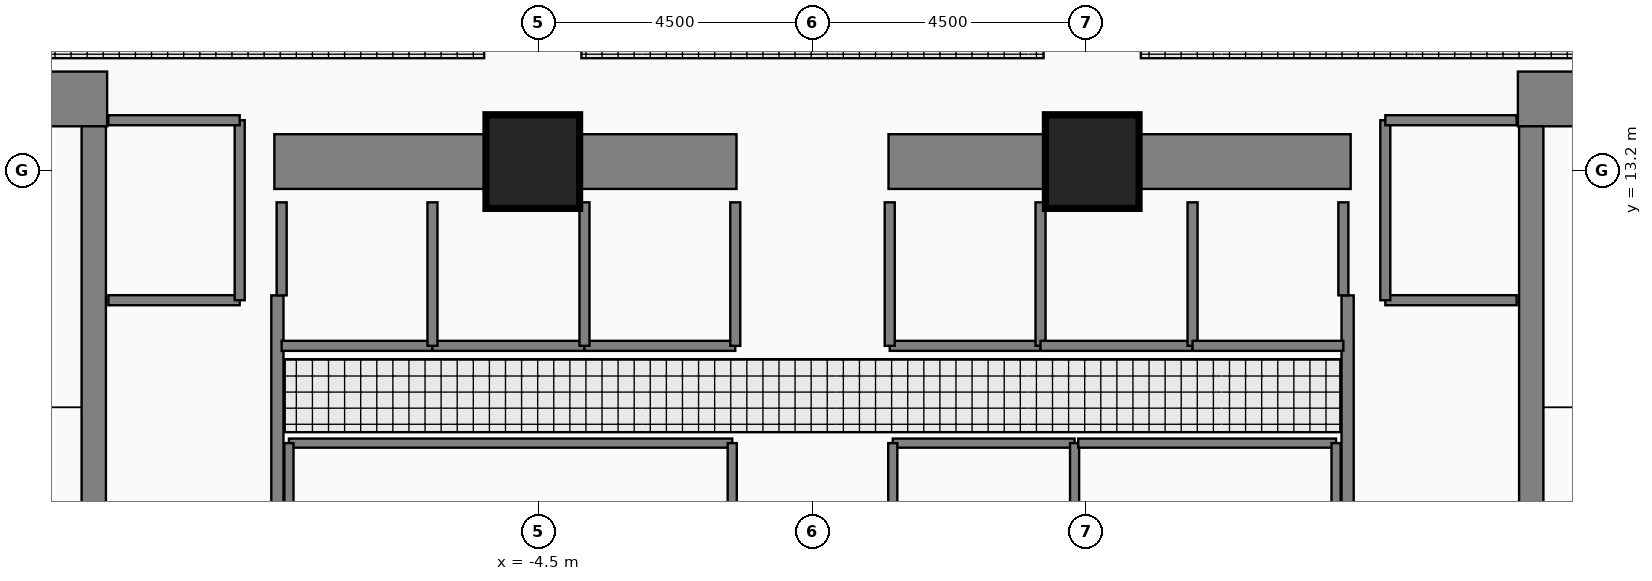
"""IFC4 building model, lengths in metres.
Left out: names, types, materials, properties, quantities, classifications, styles, units other than length and angle.
Written with IfcOpenShell. Run it as: python <this file> out.ifc"""

import sys

from ifc_helpers import new_model, si_unit, direction, frame, frame_2d, origin, origin_2d, place, context, subcontext, project, spatial, rectangle, extrude, element, fill, save


model = new_model("IFC4")
c1 = context("Model", 3, precision=1e-05, world=origin(), true_north=direction((0.0, 1.0)))
c2 = subcontext(c1, "Body", "Model", "MODEL_VIEW")
j1 = project(units=[si_unit("LENGTHUNIT", "METRE"), si_unit("PLANEANGLEUNIT", "RADIAN")], contexts=[c1])
p1 = place(None, origin())
s1 = spatial("IfcSite", under=j1, at=p1, CompositionType="ELEMENT")
p2 = place(p1, origin())
s2 = spatial("IfcBuilding", under=s1, at=p2, CompositionType="ELEMENT")
p3 = place(p2, frame((0.0, 0.0, 11.4)))
s3 = spatial("IfcBuildingStorey", under=s2, at=p3, CompositionType="ELEMENT", Elevation=11.4)
for number, where, z_axis, x_axis in (
    (1, (-16.31, 14.38, 0.0), (0.0, 0.0, 1.0), (1.0, 0.0, 0.0)),
    (2, (11.6, 14.38, 0.0), (0.0, 0.0, 1.0), (1.0, 0.0, 0.0)),
):
    element("IfcWall", number, at=place(p3, frame(where, z_axis=z_axis, x_axis=x_axis)), inside=s3, PredefinedType="SHEAR", context=c2, shape_type="SweptSolid", body=[
        extrude(rectangle(XDim=4.71, YDim=0.9, at=frame_2d((2.355, 0.0))), origin(), (0.0, 0.0, 1.0), 6.41),
    ])
for number, where, z_axis, x_axis in (
    (3, (-8.85, 13.35, 0.0), (0.0, 0.0, 1.0), (1.0, 0.0, 0.0)),
    (4, (1.25, 13.35, 0.0), (0.0, 0.0, 1.0), (1.0, 0.0, 0.0)),
):
    element("IfcWall", number, at=place(p3, frame(where, z_axis=z_axis, x_axis=x_axis)), inside=s3, PredefinedType="SHEAR", context=c2, shape_type="SweptSolid", body=[
        extrude(rectangle(XDim=7.6, YDim=0.9, at=frame_2d((3.8, 0.0))), origin(), (0.0, 0.0, 1.0), 6.34),
    ])
p4 = place(p3, frame((-11.82, 4.97, 0.0), z_axis=(0.0, 0.0, 1.0), x_axis=(0.0, 1.0, 0.0)))
e5 = element("IfcWall", 5, at=p4, inside=s3, PredefinedType="SHEAR", context=c2, shape_type="SweptSolid", body=[
    extrude(rectangle(XDim=8.96, YDim=0.4, at=frame_2d((4.48, 0.0))), origin(), (0.0, 0.0, 1.0), 6.41),
])
p5 = place(p4, frame((0.31, 0.0, 0.0)))
e6 = element("IfcOpeningElement", 6, at=p5, cuts=e5, PredefinedType="OPENING", context=c2, shape_type="SweptSolid", body=[
    extrude(rectangle(XDim=1.12, YDim=2.22, at=frame_2d((0.56, 1.11))), frame((0.0, 0.21, 0.0), z_axis=(0.0, -1.0, 0.0), x_axis=(1.0, 0.0, 0.0)), (0.0, 0.0, 1.0), 0.42),
])
p6 = place(p3, frame((11.82, 13.93, 0.0), z_axis=(0.0, 0.0, 1.0), x_axis=(0.0, -1.0, 0.0)))
e7 = element("IfcWall", 7, at=p6, inside=s3, PredefinedType="SHEAR", context=c2, shape_type="SweptSolid", body=[
    extrude(rectangle(XDim=8.96, YDim=0.4, at=frame_2d((4.48, 0.0))), origin(), (0.0, 0.0, 1.0), 6.41),
])
p7 = place(p6, frame((7.53, 0.0, 0.0)))
e8 = element("IfcOpeningElement", 8, at=p7, cuts=e7, PredefinedType="OPENING", context=c2, shape_type="SweptSolid", body=[
    extrude(rectangle(XDim=1.12, YDim=2.22, at=frame_2d((0.56, 1.11))), frame((0.0, 0.21, 0.0), z_axis=(0.0, -1.0, 0.0), x_axis=(1.0, 0.0, 0.0)), (0.0, 0.0, 1.0), 0.42),
])
for number, where, z_axis, x_axis in (
    (9, (-4.6, 13.35, 0.0), (0.0, 0.0, 1.0), (1.0, 0.0, 0.0)),
    (10, (4.6, 13.35, 0.0), (0.0, 0.0, 1.0), (1.0, 0.0, 0.0)),
):
    element("IfcColumn", number, at=place(p3, frame(where, z_axis=z_axis, x_axis=x_axis)), inside=s3, PredefinedType="COLUMN", context=c2, shape_type="SweptSolid", body=[
        extrude(rectangle(XDim=1.5, YDim=1.5, at=origin_2d()), origin(), (0.0, 0.0, 1.0), 6.6),
    ])
p8 = place(p3, frame((-8.8, 5.05, 0.0), z_axis=(0.0, 0.0, 1.0), x_axis=(0.0, 1.0, 0.0)))
e11 = element("IfcWall", 11, at=p8, inside=s3, PredefinedType="PARTITIONING", context=c2, shape_type="SweptSolid", body=[
    extrude(rectangle(XDim=6.1, YDim=0.2, at=frame_2d((3.05, 0.0))), origin(), (0.0, 0.0, 1.0), 6.34),
])
p9 = place(p8, frame((0.25, 0.0, 0.0)))
e12 = element("IfcOpeningElement", 12, at=p9, cuts=e11, PredefinedType="OPENING", context=c2, shape_type="SweptSolid", body=[
    extrude(rectangle(XDim=1.1, YDim=2.2, at=frame_2d((0.55, 1.1))), frame((0.0, 0.11, 0.0), z_axis=(0.0, -1.0, 0.0), x_axis=(1.0, 0.0, 0.0)), (0.0, 0.0, 1.0), 0.22),
])
p10 = place(p8, frame((3.85, 0.0, 0.0)))
e13 = element("IfcOpeningElement", 13, at=p10, cuts=e11, PredefinedType="OPENING", context=c2, shape_type="SweptSolid", body=[
    extrude(rectangle(XDim=1.1, YDim=2.2, at=frame_2d((0.55, 1.1))), frame((0.0, 0.11, 0.0), z_axis=(0.0, -1.0, 0.0), x_axis=(1.0, 0.0, 0.0)), (0.0, 0.0, 1.0), 0.22),
])
p11 = place(p3, frame((8.8, 11.15, 0.0), z_axis=(0.0, 0.0, 1.0), x_axis=(0.0, -1.0, 0.0)))
e14 = element("IfcWall", 14, at=p11, inside=s3, PredefinedType="PARTITIONING", context=c2, shape_type="SweptSolid", body=[
    extrude(rectangle(XDim=6.1, YDim=0.2, at=frame_2d((3.05, 0.0))), origin(), (0.0, 0.0, 1.0), 6.34),
])
p12 = place(p11, frame((1.15, 0.0, 0.0)))
e15 = element("IfcOpeningElement", 15, at=p12, cuts=e14, PredefinedType="OPENING", context=c2, shape_type="SweptSolid", body=[
    extrude(rectangle(XDim=1.1, YDim=2.2, at=frame_2d((0.55, 1.1))), frame((0.0, 0.11, 0.0), z_axis=(0.0, -1.0, 0.0), x_axis=(1.0, 0.0, 0.0)), (0.0, 0.0, 1.0), 0.22),
])
p13 = place(p11, frame((4.75, 0.0, 0.0)))
e16 = element("IfcOpeningElement", 16, at=p13, cuts=e14, PredefinedType="OPENING", context=c2, shape_type="SweptSolid", body=[
    extrude(rectangle(XDim=1.1, YDim=2.2, at=frame_2d((0.55, 1.1))), frame((0.0, 0.11, 0.0), z_axis=(0.0, -1.0, 0.0), x_axis=(1.0, 0.0, 0.0)), (0.0, 0.0, 1.0), 0.22),
])
p14 = place(p3, frame((-11.58, 11.07, 0.0), z_axis=(0.0, 0.0, 1.0), x_axis=(1.0, 0.0, 0.0)))
e17 = element("IfcWall", 17, at=p14, inside=s3, PredefinedType="PARTITIONING", context=c2, shape_type="SweptSolid", body=[
    extrude(rectangle(XDim=2.16, YDim=0.165, at=frame_2d((1.08, 0.0))), origin(), (0.0, 0.0, 1.0), 6.34),
])
p15 = place(p14, frame((0.53, 0.0, 0.0)))
e18 = element("IfcOpeningElement", 18, at=p15, cuts=e17, PredefinedType="OPENING", context=c2, shape_type="SweptSolid", body=[
    extrude(rectangle(XDim=1.15, YDim=2.25, at=frame_2d((0.575, 1.125))), frame((0.0, 0.093, 0.0), z_axis=(0.0, -1.0, 0.0), x_axis=(1.0, 0.0, 0.0)), (0.0, 0.0, 1.0), 0.185),
])
p16 = place(p3, frame((9.42, 11.07, 0.0), z_axis=(0.0, 0.0, 1.0), x_axis=(1.0, 0.0, 0.0)))
e19 = element("IfcWall", 19, at=p16, inside=s3, PredefinedType="PARTITIONING", context=c2, shape_type="SweptSolid", body=[
    extrude(rectangle(XDim=2.16, YDim=0.165, at=frame_2d((1.08, 0.0))), origin(), (0.0, 0.0, 1.0), 6.34),
])
p17 = place(p16, frame((0.53, 0.0, 0.0)))
e20 = element("IfcOpeningElement", 20, at=p17, cuts=e19, PredefinedType="OPENING", context=c2, shape_type="SweptSolid", body=[
    extrude(rectangle(XDim=1.15, YDim=2.25, at=frame_2d((0.575, 1.125))), frame((0.0, 0.093, 0.0), z_axis=(0.0, -1.0, 0.0), x_axis=(1.0, 0.0, 0.0)), (0.0, 0.0, 1.0), 0.185),
])
p18 = place(p3, frame((-8.73, 10.32, 0.0), z_axis=(0.0, 0.0, 1.0), x_axis=(1.0, 0.0, 0.0)))
e21 = element("IfcWall", 21, at=p18, inside=s3, PredefinedType="PARTITIONING", context=c2, shape_type="SweptSolid", body=[
    extrude(rectangle(XDim=2.48, YDim=0.165, at=frame_2d((1.24, 0.0))), origin(), (0.0, 0.0, 1.0), 6.34),
])
p19 = place(p18, frame((0.69, 0.0, 0.0)))
e22 = element("IfcOpeningElement", 22, at=p19, cuts=e21, PredefinedType="OPENING", context=c2, shape_type="SweptSolid", body=[
    extrude(rectangle(XDim=1.1, YDim=2.25, at=frame_2d((0.55, 1.125))), frame((0.0, 0.093, 0.0), z_axis=(0.0, -1.0, 0.0), x_axis=(1.0, 0.0, 0.0)), (0.0, 0.0, 1.0), 0.185),
])
p20 = place(p3, frame((-6.25, 10.32, 0.0), z_axis=(0.0, 0.0, 1.0), x_axis=(1.0, 0.0, 0.0)))
e23 = element("IfcWall", 23, at=p20, inside=s3, PredefinedType="PARTITIONING", context=c2, shape_type="SweptSolid", body=[
    extrude(rectangle(XDim=2.5, YDim=0.165, at=frame_2d((1.25, 0.0))), origin(), (0.0, 0.0, 1.0), 6.34),
])
p21 = place(p20, frame((0.7, 0.0, 0.0)))
e24 = element("IfcOpeningElement", 24, at=p21, cuts=e23, PredefinedType="OPENING", context=c2, shape_type="SweptSolid", body=[
    extrude(rectangle(XDim=1.1, YDim=2.25, at=frame_2d((0.55, 1.125))), frame((0.0, 0.093, 0.0), z_axis=(0.0, -1.0, 0.0), x_axis=(1.0, 0.0, 0.0)), (0.0, 0.0, 1.0), 0.185),
])
p22 = place(p3, frame((-3.75, 10.32, 0.0), z_axis=(0.0, 0.0, 1.0), x_axis=(1.0, 0.0, 0.0)))
e25 = element("IfcWall", 25, at=p22, inside=s3, PredefinedType="PARTITIONING", context=c2, shape_type="SweptSolid", body=[
    extrude(rectangle(XDim=2.48, YDim=0.165, at=frame_2d((1.24, 0.0))), origin(), (0.0, 0.0, 1.0), 6.34),
])
p23 = place(p22, frame((0.69, 0.0, 0.0)))
e26 = element("IfcOpeningElement", 26, at=p23, cuts=e25, PredefinedType="OPENING", context=c2, shape_type="SweptSolid", body=[
    extrude(rectangle(XDim=1.1, YDim=2.25, at=frame_2d((0.55, 1.125))), frame((0.0, 0.093, 0.0), z_axis=(0.0, -1.0, 0.0), x_axis=(1.0, 0.0, 0.0)), (0.0, 0.0, 1.0), 0.185),
])
p24 = place(p3, frame((1.27, 10.32, 0.0), z_axis=(0.0, 0.0, 1.0), x_axis=(1.0, 0.0, 0.0)))
e27 = element("IfcWall", 27, at=p24, inside=s3, PredefinedType="PARTITIONING", context=c2, shape_type="SweptSolid", body=[
    extrude(rectangle(XDim=2.48, YDim=0.165, at=frame_2d((1.24, 0.0))), origin(), (0.0, 0.0, 1.0), 6.34),
])
p25 = place(p24, frame((0.69, 0.0, 0.0)))
e28 = element("IfcOpeningElement", 28, at=p25, cuts=e27, PredefinedType="OPENING", context=c2, shape_type="SweptSolid", body=[
    extrude(rectangle(XDim=1.1, YDim=2.25, at=frame_2d((0.55, 1.125))), frame((0.0, 0.093, 0.0), z_axis=(0.0, -1.0, 0.0), x_axis=(1.0, 0.0, 0.0)), (0.0, 0.0, 1.0), 0.185),
])
p26 = place(p3, frame((1.32, 8.72, 0.0), z_axis=(0.0, 0.0, 1.0), x_axis=(1.0, 0.0, 0.0)))
e29 = element("IfcWall", 29, at=p26, inside=s3, PredefinedType="PARTITIONING", context=c2, shape_type="SweptSolid", body=[
    extrude(rectangle(XDim=2.99, YDim=0.15, at=frame_2d((1.495, 0.0))), origin(), (0.0, 0.0, 1.0), 6.34),
])
p27 = place(p26, frame((1.045, 0.0, 0.0)))
e30 = element("IfcOpeningElement", 30, at=p27, cuts=e29, PredefinedType="OPENING", context=c2, shape_type="SweptSolid", body=[
    extrude(rectangle(XDim=0.9, YDim=2.15, at=frame_2d((0.45, 1.075))), frame((0.0, 0.085, 0.0), z_axis=(0.0, -1.0, 0.0), x_axis=(1.0, 0.0, 0.0)), (0.0, 0.0, 1.0), 0.17),
])
p28 = place(p3, frame((-9.42, 11.07, 0.0), z_axis=(0.0, 0.0, 1.0), x_axis=(0.0, 1.0, 0.0)))
e31 = element("IfcWall", 31, at=p28, inside=s3, PredefinedType="PARTITIONING", context=c2, shape_type="SweptSolid", body=[
    extrude(rectangle(XDim=2.96, YDim=0.165, at=frame_2d((1.48, 0.0))), origin(), (0.0, 0.0, 1.0), 6.34),
])
p29 = place(p3, frame((-11.58, 14.03, 0.0), z_axis=(0.0, 0.0, 1.0), x_axis=(1.0, 0.0, 0.0)))
e32 = element("IfcWall", 32, at=p29, inside=s3, PredefinedType="PARTITIONING", context=c2, shape_type="SweptSolid", body=[
    extrude(rectangle(XDim=2.16, YDim=0.165, at=frame_2d((1.08, 0.0))), origin(), (0.0, 0.0, 1.0), 6.34),
])
p30 = place(p3, frame((9.42, 11.07, 0.0), z_axis=(0.0, 0.0, 1.0), x_axis=(0.0, 1.0, 0.0)))
e33 = element("IfcWall", 33, at=p30, inside=s3, PredefinedType="PARTITIONING", context=c2, shape_type="SweptSolid", body=[
    extrude(rectangle(XDim=2.96, YDim=0.165, at=frame_2d((1.48, 0.0))), origin(), (0.0, 0.0, 1.0), 6.34),
])
p31 = place(p3, frame((9.42, 14.03, 0.0), z_axis=(0.0, 0.0, 1.0), x_axis=(1.0, 0.0, 0.0)))
e34 = element("IfcWall", 34, at=p31, inside=s3, PredefinedType="PARTITIONING", context=c2, shape_type="SweptSolid", body=[
    extrude(rectangle(XDim=2.16, YDim=0.165, at=frame_2d((1.08, 0.0))), origin(), (0.0, 0.0, 1.0), 6.34),
])
p32 = place(p3, frame((-8.73, 11.15, 0.0), z_axis=(0.0, 0.0, 1.0), x_axis=(0.0, 1.0, 0.0)))
e35 = element("IfcWall", 35, at=p32, inside=s3, PredefinedType="PARTITIONING", context=c2, shape_type="SweptSolid", body=[
    extrude(rectangle(XDim=1.53, YDim=0.165, at=frame_2d((0.765, 0.0))), origin(), (0.0, 0.0, 1.0), 6.34),
])
for number, where, z_axis, x_axis in (
    (36, (-6.25, 10.32, 0.0), (0.0, 0.0, 1.0), (0.0, 1.0, 0.0)),
    (37, (-3.75, 10.32, 0.0), (0.0, 0.0, 1.0), (0.0, 1.0, 0.0)),
    (38, (-1.27, 10.32, 0.0), (0.0, 0.0, 1.0), (0.0, 1.0, 0.0)),
    (39, (1.27, 10.32, 0.0), (0.0, 0.0, 1.0), (0.0, 1.0, 0.0)),
    (40, (3.75, 10.32, 0.0), (0.0, 0.0, 1.0), (0.0, 1.0, 0.0)),
):
    element("IfcWall", number, at=place(p3, frame(where, z_axis=z_axis, x_axis=x_axis)), inside=s3, PredefinedType="PARTITIONING", context=c2, shape_type="SweptSolid", body=[
        extrude(rectangle(XDim=2.36, YDim=0.165, at=frame_2d((1.18, 0.0))), origin(), (0.0, 0.0, 1.0), 6.34),
    ])
p33 = place(p3, frame((3.75, 10.32, 0.0), z_axis=(0.0, 0.0, 1.0), x_axis=(1.0, 0.0, 0.0)))
e41 = element("IfcWall", 41, at=p33, inside=s3, PredefinedType="PARTITIONING", context=c2, shape_type="SweptSolid", body=[
    extrude(rectangle(XDim=2.5, YDim=0.165, at=frame_2d((1.25, 0.0))), origin(), (0.0, 0.0, 1.0), 6.34),
])
p34 = place(p3, frame((6.25, 10.32, 0.0), z_axis=(0.0, 0.0, 1.0), x_axis=(0.0, 1.0, 0.0)))
e42 = element("IfcWall", 42, at=p34, inside=s3, PredefinedType="PARTITIONING", context=c2, shape_type="SweptSolid", body=[
    extrude(rectangle(XDim=2.36, YDim=0.165, at=frame_2d((1.18, 0.0))), origin(), (0.0, 0.0, 1.0), 6.34),
])
p35 = place(p3, frame((6.25, 10.32, 0.0), z_axis=(0.0, 0.0, 1.0), x_axis=(1.0, 0.0, 0.0)))
e43 = element("IfcWall", 43, at=p35, inside=s3, PredefinedType="PARTITIONING", context=c2, shape_type="SweptSolid", body=[
    extrude(rectangle(XDim=2.48, YDim=0.165, at=frame_2d((1.24, 0.0))), origin(), (0.0, 0.0, 1.0), 6.34),
])
p36 = place(p3, frame((8.73, 11.15, 0.0), z_axis=(0.0, 0.0, 1.0), x_axis=(0.0, 1.0, 0.0)))
e44 = element("IfcWall", 44, at=p36, inside=s3, PredefinedType="PARTITIONING", context=c2, shape_type="SweptSolid", body=[
    extrude(rectangle(XDim=1.53, YDim=0.165, at=frame_2d((0.765, 0.0))), origin(), (0.0, 0.0, 1.0), 6.34),
])
p37 = place(p3, frame((-8.61, 8.72, 0.0), z_axis=(0.0, 0.0, 1.0), x_axis=(1.0, 0.0, 0.0)))
e45 = element("IfcWall", 45, at=p37, inside=s3, PredefinedType="PARTITIONING", context=c2, shape_type="SweptSolid", body=[
    extrude(rectangle(XDim=7.29, YDim=0.15, at=frame_2d((3.645, 0.0))), origin(), (0.0, 0.0, 1.0), 6.34),
])
for number, where, z_axis, x_axis in (
    (46, (-8.61, 6.48, 0.0), (0.0, 0.0, 1.0), (0.0, 1.0, 0.0)),
    (47, (-1.32, 6.48, 0.0), (0.0, 0.0, 1.0), (0.0, 1.0, 0.0)),
    (48, (1.32, 6.48, 0.0), (0.0, 0.0, 1.0), (0.0, 1.0, 0.0)),
    (49, (4.31, 6.48, 0.0), (0.0, 0.0, 1.0), (0.0, 1.0, 0.0)),
):
    element("IfcWall", number, at=place(p3, frame(where, z_axis=z_axis, x_axis=x_axis)), inside=s3, PredefinedType="PARTITIONING", context=c2, shape_type="SweptSolid", body=[
        extrude(rectangle(XDim=2.24, YDim=0.15, at=frame_2d((1.12, 0.0))), origin(), (0.0, 0.0, 1.0), 6.34),
    ])
p38 = place(p3, frame((4.37, 8.72, 0.0), z_axis=(0.0, 0.0, 1.0), x_axis=(1.0, 0.0, 0.0)))
e50 = element("IfcWall", 50, at=p38, inside=s3, PredefinedType="PARTITIONING", context=c2, shape_type="SweptSolid", body=[
    extrude(rectangle(XDim=4.24, YDim=0.15, at=frame_2d((2.12, 0.0))), origin(), (0.0, 0.0, 1.0), 6.34),
])
p39 = place(p3, frame((8.61, 6.48, 0.0), z_axis=(0.0, 0.0, 1.0), x_axis=(0.0, 1.0, 0.0)))
e51 = element("IfcWall", 51, at=p39, inside=s3, PredefinedType="PARTITIONING", context=c2, shape_type="SweptSolid", body=[
    extrude(rectangle(XDim=2.24, YDim=0.15, at=frame_2d((1.12, 0.0))), origin(), (0.0, 0.0, 1.0), 6.34),
])
p40 = place(p10, origin())
e52 = element("IfcDoor", 52, at=p40, inside=s3, OperationType="SINGLE_SWING_LEFT", PredefinedType="DOOR", context=c2, shape_type="SweptSolid", body=[
    extrude(rectangle(XDim=1.1, YDim=2.2, at=frame_2d((0.55, 1.1))), frame((0.0, 0.025, 0.0), z_axis=(0.0, -1.0, 0.0), x_axis=(1.0, 0.0, 0.0)), (0.0, 0.0, 1.0), 0.05),
])
fill(e13, e52)
p41 = place(p12, origin())
e53 = element("IfcDoor", 53, at=p41, inside=s3, OperationType="SINGLE_SWING_RIGHT", PredefinedType="DOOR", context=c2, shape_type="SweptSolid", body=[
    extrude(rectangle(XDim=1.1, YDim=2.2, at=frame_2d((0.55, 1.1))), frame((0.0, 0.025, 0.0), z_axis=(0.0, -1.0, 0.0), x_axis=(1.0, 0.0, 0.0)), (0.0, 0.0, 1.0), 0.05),
])
fill(e15, e53)
p42 = place(p15, origin())
e54 = element("IfcDoor", 54, at=p42, inside=s3, OperationType="SLIDING_TO_LEFT", PredefinedType="DOOR", context=c2, shape_type="SweptSolid", body=[
    extrude(rectangle(XDim=1.15, YDim=2.25, at=frame_2d((0.575, 1.125))), frame((0.0, 0.025, 0.0), z_axis=(0.0, -1.0, 0.0), x_axis=(1.0, 0.0, 0.0)), (0.0, 0.0, 1.0), 0.05),
])
fill(e18, e54)
p43 = place(p17, origin())
e55 = element("IfcDoor", 55, at=p43, inside=s3, OperationType="SLIDING_TO_LEFT", PredefinedType="DOOR", context=c2, shape_type="SweptSolid", body=[
    extrude(rectangle(XDim=1.15, YDim=2.25, at=frame_2d((0.575, 1.125))), frame((0.0, 0.025, 0.0), z_axis=(0.0, -1.0, 0.0), x_axis=(1.0, 0.0, 0.0)), (0.0, 0.0, 1.0), 0.05),
])
fill(e20, e55)
p44 = place(p19, origin())
e56 = element("IfcDoor", 56, at=p44, inside=s3, OperationType="SLIDING_TO_LEFT", PredefinedType="DOOR", context=c2, shape_type="SweptSolid", body=[
    extrude(rectangle(XDim=1.1, YDim=2.25, at=frame_2d((0.55, 1.125))), frame((0.0, 0.025, 0.0), z_axis=(0.0, -1.0, 0.0), x_axis=(1.0, 0.0, 0.0)), (0.0, 0.0, 1.0), 0.05),
])
fill(e22, e56)
p45 = place(p21, origin())
e57 = element("IfcDoor", 57, at=p45, inside=s3, OperationType="SLIDING_TO_LEFT", PredefinedType="DOOR", context=c2, shape_type="SweptSolid", body=[
    extrude(rectangle(XDim=1.1, YDim=2.25, at=frame_2d((0.55, 1.125))), frame((0.0, 0.025, 0.0), z_axis=(0.0, -1.0, 0.0), x_axis=(1.0, 0.0, 0.0)), (0.0, 0.0, 1.0), 0.05),
])
fill(e24, e57)
p46 = place(p23, origin())
e58 = element("IfcDoor", 58, at=p46, inside=s3, OperationType="SLIDING_TO_LEFT", PredefinedType="DOOR", context=c2, shape_type="SweptSolid", body=[
    extrude(rectangle(XDim=1.1, YDim=2.25, at=frame_2d((0.55, 1.125))), frame((0.0, 0.025, 0.0), z_axis=(0.0, -1.0, 0.0), x_axis=(1.0, 0.0, 0.0)), (0.0, 0.0, 1.0), 0.05),
])
fill(e26, e58)
p47 = place(p25, origin())
e59 = element("IfcDoor", 59, at=p47, inside=s3, OperationType="SLIDING_TO_LEFT", PredefinedType="DOOR", context=c2, shape_type="SweptSolid", body=[
    extrude(rectangle(XDim=1.1, YDim=2.25, at=frame_2d((0.55, 1.125))), frame((0.0, 0.025, 0.0), z_axis=(0.0, -1.0, 0.0), x_axis=(1.0, 0.0, 0.0)), (0.0, 0.0, 1.0), 0.05),
])
fill(e28, e59)
p48 = place(p27, origin())
e60 = element("IfcDoor", 60, at=p48, inside=s3, OperationType="SINGLE_SWING_LEFT", PredefinedType="DOOR", context=c2, shape_type="SweptSolid", body=[
    extrude(rectangle(XDim=0.9, YDim=2.15, at=frame_2d((0.45, 1.075))), frame((0.0, 0.025, 0.0), z_axis=(0.0, -1.0, 0.0), x_axis=(1.0, 0.0, 0.0)), (0.0, 0.0, 1.0), 0.05),
])
fill(e30, e60)
save(model, sys.argv[1])
